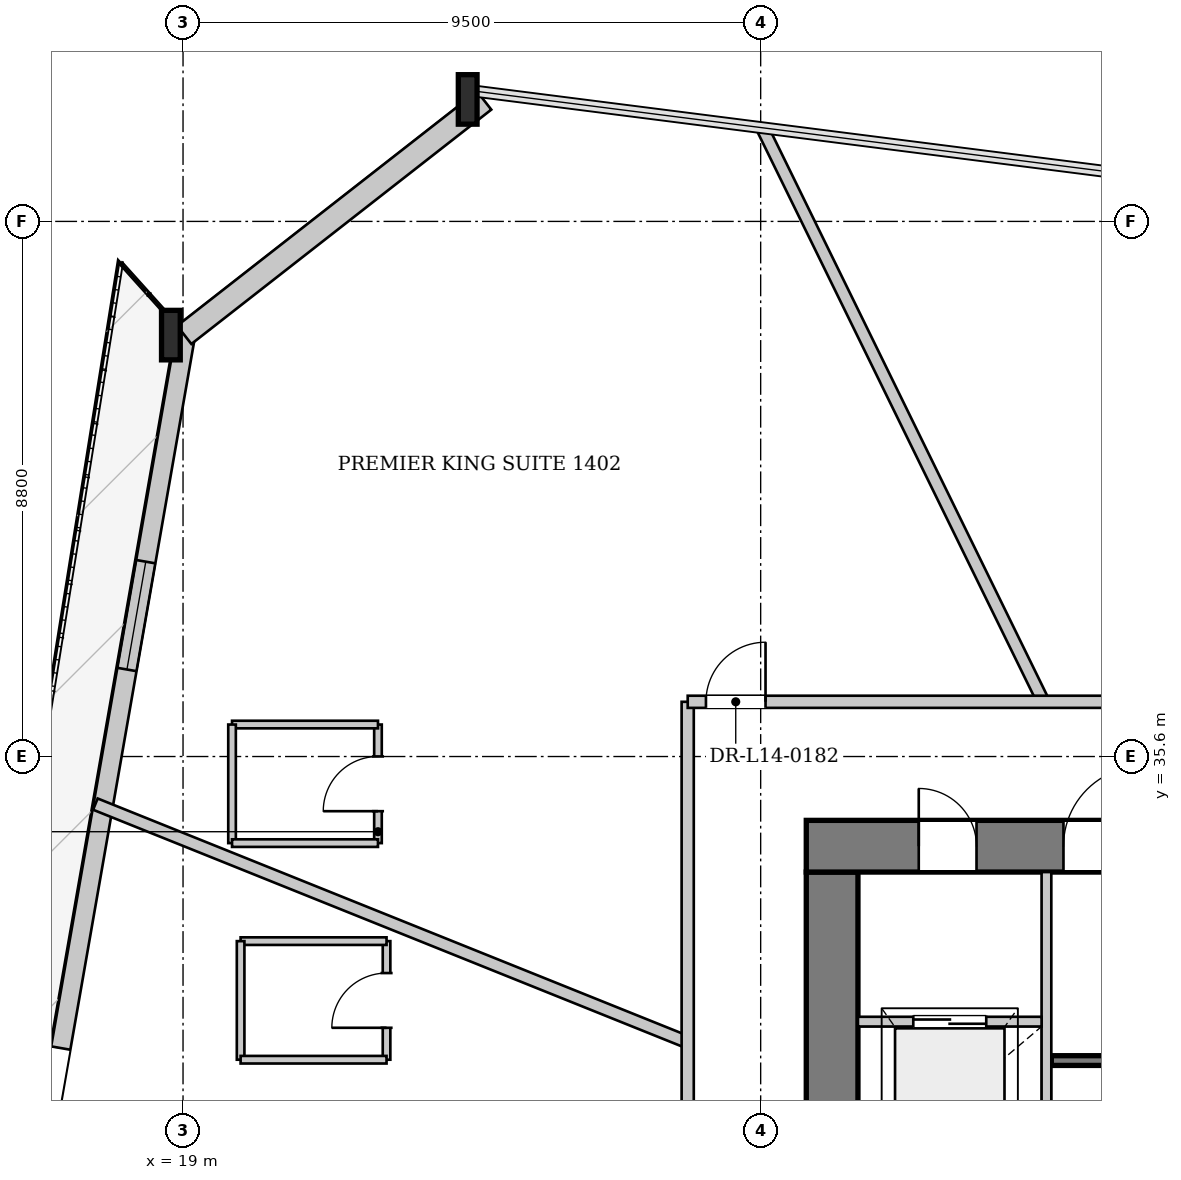
"""IFC4 building model, lengths in metres.
Left out: names, types, materials, properties, quantities, classifications, styles, units other than length and angle.
Written with IfcOpenShell. Run it as: python <this file> out.ifc"""

import sys

from ifc_helpers import new_model, si_unit, direction, frame, frame_2d, origin, origin_2d, place, context, subcontext, project, spatial, rectangle, i_section, extrude, source, transform, mapped, element, fill, save


model = new_model("IFC4")
c1 = context("Model", 3, precision=1e-05, world=origin(), true_north=direction((0.0, 1.0)))
c2 = subcontext(c1, "Body", "Model", "MODEL_VIEW")
j1 = project(units=[si_unit("LENGTHUNIT", "METRE"), si_unit("PLANEANGLEUNIT", "RADIAN")], contexts=[c1])
p1 = place(None, origin())
s1 = spatial("IfcSite", under=j1, at=p1, CompositionType="ELEMENT")
p2 = place(p1, origin())
s2 = spatial("IfcBuilding", under=s1, at=p2, CompositionType="ELEMENT")
p3 = place(p2, frame((0.0, 0.0, 57.7)))
s3 = spatial("IfcBuildingStorey", under=s2, at=p3, CompositionType="ELEMENT", Elevation=57.7)
m1 = source(origin(), c2, "Body", "SweptSolid", [
    extrude(i_section(OverallWidth=0.308, OverallDepth=0.814, WebThickness=0.021, FlangeThickness=0.04, at=origin_2d()), origin(), (0.0, 0.0, 1.0), 3.409),
])
p4 = place(p3, frame((23.836, 46.538, 0.0), z_axis=(-0.090445857066, -0.077269263479, 0.992899293917), x_axis=(0.649551107767, -0.760317932446, 0.0)))
e1 = element("IfcColumn", 1, at=p4, inside=s3, PredefinedType="COLUMN", context=c2, shape_type="MappedRepresentation", body=[
    mapped(m1, transform((0.0, 0.0, 0.0), x_axis=(1.0, 0.0, 0.0), y_axis=(0.0, 1.0, 0.0), z_axis=(0.0, 0.0, 1.0), scale=1.0)),
])
m2 = source(origin(), c2, "Body", "SweptSolid", [
    extrude(i_section(OverallWidth=0.308, OverallDepth=0.814, WebThickness=0.021, FlangeThickness=0.04, at=origin_2d()), origin(), (0.0, 0.0, 1.0), 3.405),
])
p5 = place(p3, frame((18.903, 42.684, 0.0), z_axis=(-0.060441534737, -0.090124566031, 0.994094755784), x_axis=(0.830522417348, -0.556985201133, 0.0)))
e2 = element("IfcColumn", 2, at=p5, inside=s3, PredefinedType="COLUMN", context=c2, shape_type="MappedRepresentation", body=[
    mapped(m2, transform((0.0, 0.0, 0.0), x_axis=(1.0, 0.0, 0.0), y_axis=(0.0, 1.0, 0.0), z_axis=(0.0, 0.0, 1.0), scale=1.0)),
])
p6 = place(p3, frame((15.875, 24.432, 0.0), z_axis=(0.0, 0.0, 1.0), x_axis=(0.172204905353, 0.985061150677, 0.0)))
e3 = element("IfcWall", 3, at=p6, inside=s3, PredefinedType="SOLIDWALL", context=c2, shape_type="SweptSolid", body=[
    extrude(rectangle(XDim=18.5, YDim=0.32, at=frame_2d((9.25, 0.0))), origin(), (0.0, 0.0, 1.0), 2.592),
])
p7 = place(p6, frame((5.37, 0.0, 0.0)))
e4 = element("IfcOpeningElement", 4, at=p7, cuts=e3, PredefinedType="OPENING", context=c2, shape_type="SweptSolid", body=[
    extrude(rectangle(XDim=1.1, YDim=2.3, at=frame_2d((0.55, 1.15))), frame((0.0, 0.17, 0.0), z_axis=(0.0, -1.0, 0.0), x_axis=(1.0, 0.0, 0.0)), (0.0, 0.0, 1.0), 0.34),
])
p8 = place(p6, frame((12.79, 0.0, 0.272)))
e5 = element("IfcOpeningElement", 5, at=p8, cuts=e3, PredefinedType="OPENING", context=c2, shape_type="SweptSolid", body=[
    extrude(rectangle(XDim=1.8, YDim=2.2, at=frame_2d((0.9, 1.1))), frame((0.0, 0.17, 0.0), z_axis=(0.0, -1.0, 0.0), x_axis=(1.0, 0.0, 0.0)), (0.0, 0.0, 1.0), 0.34),
])
p9 = place(p3, frame((19.02, 42.534, 0.0), z_axis=(0.0, 0.0, 1.0), x_axis=(0.787974703517, 0.615707614552, 0.0)))
e6 = element("IfcWall", 6, at=p9, inside=s3, PredefinedType="SOLIDWALL", context=c2, shape_type="SweptSolid", body=[
    extrude(rectangle(XDim=6.26, YDim=0.38, at=frame_2d((3.13, 0.0))), origin(), (0.0, 0.0, 1.0), 2.592),
])
p10 = place(p3, frame((29.675, 19.5, 0.0), z_axis=(0.0, 0.0, 1.0), x_axis=(0.0, 1.0, 0.0)))
e7 = element("IfcWall", 7, at=p10, inside=s3, PredefinedType="SHEAR", context=c2, shape_type="SweptSolid", body=[
    extrude(rectangle(XDim=14.2, YDim=0.85, at=frame_2d((7.1, 0.0))), origin(), (0.0, 0.0, 1.0), 3.3),
])
p11 = place(p10, frame((7.42, 0.0, 0.0)))
e8 = element("IfcOpeningElement", 8, at=p11, cuts=e7, PredefinedType="OPENING", context=c2, shape_type="SweptSolid", body=[
    extrude(rectangle(XDim=1.6, YDim=2.2, at=frame_2d((0.8, 1.1))), frame((0.0, 0.435, 0.0), z_axis=(0.0, -1.0, 0.0), x_axis=(1.0, 0.0, 0.0)), (0.0, 0.0, 1.0), 0.87),
])
p12 = place(p3, frame((29.25, 34.125, 0.0), z_axis=(0.0, 0.0, 1.0), x_axis=(1.0, 0.0, 0.0)))
e9 = element("IfcWall", 9, at=p12, inside=s3, PredefinedType="SHEAR", context=c2, shape_type="SweptSolid", body=[
    extrude(rectangle(XDim=17.5, YDim=0.85, at=frame_2d((8.75, 0.0))), origin(), (0.0, 0.0, 1.0), 3.3),
])
p13 = place(p12, frame((1.85, 0.0, 0.0)))
e10 = element("IfcOpeningElement", 10, at=p13, cuts=e9, PredefinedType="OPENING", context=c2, shape_type="SweptSolid", body=[
    extrude(rectangle(XDim=0.95, YDim=2.1, at=frame_2d((0.475, 1.05))), frame((0.0, 0.435, 0.0), z_axis=(0.0, -1.0, 0.0), x_axis=(1.0, 0.0, 0.0)), (0.0, 0.0, 1.0), 0.87),
])
p14 = place(p12, frame((4.23, 0.0, 0.0)))
e11 = element("IfcOpeningElement", 11, at=p14, cuts=e9, PredefinedType="OPENING", context=c2, shape_type="SweptSolid", body=[
    extrude(rectangle(XDim=1.32, YDim=2.2, at=frame_2d((0.66, 1.1))), frame((0.0, 0.435, 0.0), z_axis=(0.0, -1.0, 0.0), x_axis=(1.0, 0.0, 0.0)), (0.0, 0.0, 1.0), 0.87),
])
p15 = place(p12, frame((15.3, 0.0, 0.0)))
e12 = element("IfcOpeningElement", 12, at=p15, cuts=e9, PredefinedType="OPENING", context=c2, shape_type="SweptSolid", body=[
    extrude(rectangle(XDim=0.95, YDim=2.1, at=frame_2d((0.475, 1.05))), frame((0.0, 0.435, 0.0), z_axis=(0.0, -1.0, 0.0), x_axis=(1.0, 0.0, 0.0)), (0.0, 0.0, 1.0), 0.87),
])
p16 = place(p3, frame((33.28, 30.6, 0.0), z_axis=(0.0, 0.0, 1.0), x_axis=(1.0, 0.0, 0.0)))
e13 = element("IfcWall", 13, at=p16, inside=s3, PredefinedType="PARTITIONING", context=c2, shape_type="SweptSolid", body=[
    extrude(rectangle(XDim=7.3, YDim=0.16, at=frame_2d((3.65, 0.0))), origin(), (0.0, 0.0, 1.0), 3.3),
])
p17 = place(p3, frame((33.2, 28.44, 0.0), z_axis=(0.0, 0.0, 1.0), x_axis=(0.0, 1.0, 0.0)))
e14 = element("IfcWall", 14, at=p17, inside=s3, PredefinedType="PARTITIONING", context=c2, shape_type="SweptSolid", body=[
    extrude(rectangle(XDim=5.26, YDim=0.16, at=frame_2d((2.63, 0.0))), origin(), (0.0, 0.0, 1.0), 3.3),
])
p18 = place(p3, frame((30.1, 31.24, 0.0), z_axis=(0.0, 0.0, 1.0), x_axis=(1.0, 0.0, 0.0)))
e15 = element("IfcWall", 15, at=p18, inside=s3, PredefinedType="PARTITIONING", context=c2, shape_type="SweptSolid", body=[
    extrude(rectangle(XDim=3.02, YDim=0.16, at=frame_2d((1.51, 0.0))), origin(), (0.0, 0.0, 1.0), 3.3),
])
p19 = place(p18, frame((0.91, 0.0, 0.0)))
e16 = element("IfcOpeningElement", 16, at=p19, cuts=e15, PredefinedType="OPENING", context=c2, shape_type="SweptSolid", body=[
    extrude(rectangle(XDim=1.2, YDim=2.2, at=frame_2d((0.6, 1.1))), frame((0.0, 0.09, 0.0), z_axis=(0.0, -1.0, 0.0), x_axis=(1.0, 0.0, 0.0)), (0.0, 0.0, 1.0), 0.18),
])
p20 = place(p3, frame((33.15, 36.5, 0.0), z_axis=(0.0, 0.0, 1.0), x_axis=(-0.439918845191, 0.898037532426, 0.0)))
e17 = element("IfcWall", 17, at=p20, inside=s3, PredefinedType="PARTITIONING", context=c2, shape_type="SweptSolid", body=[
    extrude(rectangle(XDim=10.477, YDim=0.2, at=frame_2d((5.238, 0.0))), origin(), (0.0, 0.0, 1.0), 3.3),
])
p21 = place(p3, frame((27.3, 30.901, 0.0), z_axis=(0.0, 0.0, 1.0), x_axis=(-0.927840286719, 0.372977750463, 0.0)))
e18 = element("IfcWall", 18, at=p21, inside=s3, PredefinedType="PARTITIONING", context=c2, shape_type="SweptSolid", body=[
    extrude(rectangle(XDim=10.499, YDim=0.2, at=frame_2d((5.25, 0.0))), origin(), (0.0, 0.0, 1.0), 3.3),
])
p22 = place(p3, frame((22.206, 34.176, 0.0), z_axis=(0.0, 0.0, 1.0), x_axis=(0.0, 1.0, 0.0)))
e19 = element("IfcWall", 19, at=p22, inside=s3, PredefinedType="PARTITIONING", context=c2, shape_type="SweptSolid", body=[
    extrude(rectangle(XDim=1.95, YDim=0.125, at=frame_2d((0.975, 0.0))), origin(), (0.0, 0.0, 1.0), 2.925),
])
p23 = place(p22, frame((0.525, 0.0, 0.0)))
e20 = element("IfcOpeningElement", 20, at=p23, cuts=e19, PredefinedType="OPENING", context=c2, shape_type="SweptSolid", body=[
    extrude(rectangle(XDim=0.9, YDim=2.1, at=frame_2d((0.45, 1.05))), frame((0.0, 0.073, 0.0), z_axis=(0.0, -1.0, 0.0), x_axis=(1.0, 0.0, 0.0)), (0.0, 0.0, 1.0), 0.145),
])
p24 = place(p3, frame((22.206, 36.126, 0.0), z_axis=(0.0, 0.0, 1.0), x_axis=(-1.0, 0.0, 0.0)))
e21 = element("IfcWall", 21, at=p24, inside=s3, PredefinedType="PARTITIONING", context=c2, shape_type="SweptSolid", body=[
    extrude(rectangle(XDim=2.4, YDim=0.125, at=frame_2d((1.2, 0.0))), origin(), (0.0, 0.0, 1.0), 3.3),
])
p25 = place(p3, frame((19.806, 36.126, 0.0), z_axis=(0.0, 0.0, 1.0), x_axis=(0.0, -1.0, 0.0)))
e22 = element("IfcWall", 22, at=p25, inside=s3, PredefinedType="PARTITIONING", context=c2, shape_type="SweptSolid", body=[
    extrude(rectangle(XDim=1.95, YDim=0.125, at=frame_2d((0.975, 0.0))), origin(), (0.0, 0.0, 1.0), 3.3),
])
p26 = place(p3, frame((19.806, 34.176, 0.0), z_axis=(0.0, 0.0, 1.0), x_axis=(1.0, 0.0, 0.0)))
e23 = element("IfcWall", 23, at=p26, inside=s3, PredefinedType="PARTITIONING", context=c2, shape_type="SweptSolid", body=[
    extrude(rectangle(XDim=2.4, YDim=0.125, at=frame_2d((1.2, 0.0))), origin(), (0.0, 0.0, 1.0), 3.3),
])
p27 = place(p3, frame((22.347, 30.614, 0.0), z_axis=(0.0, 0.0, 1.0), x_axis=(0.0, 1.0, 0.0)))
e24 = element("IfcWall", 24, at=p27, inside=s3, PredefinedType="PARTITIONING", context=c2, shape_type="SweptSolid", body=[
    extrude(rectangle(XDim=1.95, YDim=0.125, at=frame_2d((0.975, 0.0))), origin(), (0.0, 0.0, 1.0), 2.925),
])
p28 = place(p27, frame((0.525, 0.0, 0.0)))
e25 = element("IfcOpeningElement", 25, at=p28, cuts=e24, PredefinedType="OPENING", context=c2, shape_type="SweptSolid", body=[
    extrude(rectangle(XDim=0.9, YDim=2.1, at=frame_2d((0.45, 1.05))), frame((0.0, 0.073, 0.0), z_axis=(0.0, -1.0, 0.0), x_axis=(1.0, 0.0, 0.0)), (0.0, 0.0, 1.0), 0.145),
])
p29 = place(p3, frame((22.347, 32.564, 0.0), z_axis=(0.0, 0.0, 1.0), x_axis=(-1.0, 0.0, 0.0)))
e26 = element("IfcWall", 26, at=p29, inside=s3, PredefinedType="PARTITIONING", context=c2, shape_type="SweptSolid", body=[
    extrude(rectangle(XDim=2.4, YDim=0.125, at=frame_2d((1.2, 0.0))), origin(), (0.0, 0.0, 1.0), 3.3),
])
p30 = place(p3, frame((19.947, 32.564, 0.0), z_axis=(0.0, 0.0, 1.0), x_axis=(0.0, -1.0, 0.0)))
e27 = element("IfcWall", 27, at=p30, inside=s3, PredefinedType="PARTITIONING", context=c2, shape_type="SweptSolid", body=[
    extrude(rectangle(XDim=1.95, YDim=0.125, at=frame_2d((0.975, 0.0))), origin(), (0.0, 0.0, 1.0), 3.3),
])
p31 = place(p3, frame((19.947, 30.614, 0.0), z_axis=(0.0, 0.0, 1.0), x_axis=(1.0, 0.0, 0.0)))
e28 = element("IfcWall", 28, at=p31, inside=s3, PredefinedType="PARTITIONING", context=c2, shape_type="SweptSolid", body=[
    extrude(rectangle(XDim=2.4, YDim=0.125, at=frame_2d((1.2, 0.0))), origin(), (0.0, 0.0, 1.0), 3.3),
])
p32 = place(p3, frame((27.3, 16.7, 0.0), z_axis=(0.0, 0.0, 1.0), x_axis=(0.0, 1.0, 0.0)))
e29 = element("IfcWall", 29, at=p32, inside=s3, PredefinedType="PARTITIONING", context=c2, shape_type="SweptSolid", body=[
    extrude(rectangle(XDim=19.8, YDim=0.2, at=frame_2d((9.9, 0.0))), origin(), (0.0, 0.0, 1.0), 3.3),
])
p33 = place(p32, frame((10.32, 0.0, 0.0)))
e30 = element("IfcOpeningElement", 30, at=p33, cuts=e29, PredefinedType="OPENING", context=c2, shape_type="SweptSolid", body=[
    extrude(rectangle(XDim=0.98, YDim=2.15, at=frame_2d((0.49, 1.075))), frame((0.0, 0.11, 0.0), z_axis=(0.0, -1.0, 0.0), x_axis=(1.0, 0.0, 0.0)), (0.0, 0.0, 1.0), 0.22),
])
p34 = place(p3, frame((27.3, 36.5, 0.0), z_axis=(0.0, 0.0, 1.0), x_axis=(1.0, 0.0, 0.0)))
e31 = element("IfcWall", 31, at=p34, inside=s3, PredefinedType="PARTITIONING", context=c2, shape_type="SweptSolid", body=[
    extrude(rectangle(XDim=21.4, YDim=0.2, at=frame_2d((10.7, 0.0))), origin(), (0.0, 0.0, 1.0), 3.3),
])
p35 = place(p34, frame((20.12, 0.0, 0.0)))
e32 = element("IfcOpeningElement", 32, at=p35, cuts=e31, PredefinedType="OPENING", context=c2, shape_type="SweptSolid", body=[
    extrude(rectangle(XDim=0.98, YDim=2.15, at=frame_2d((0.49, 1.075))), frame((0.0, 0.11, 0.0), z_axis=(0.0, -1.0, 0.0), x_axis=(1.0, 0.0, 0.0)), (0.0, 0.0, 1.0), 0.22),
])
p36 = place(p34, frame((0.3, 0.0, 0.0)))
e33 = element("IfcOpeningElement", 33, at=p36, cuts=e31, PredefinedType="OPENING", context=c2, shape_type="SweptSolid", body=[
    extrude(rectangle(XDim=0.98, YDim=2.15, at=frame_2d((0.49, 1.075))), frame((0.0, 0.11, 0.0), z_axis=(0.0, -1.0, 0.0), x_axis=(1.0, 0.0, 0.0)), (0.0, 0.0, 1.0), 0.22),
])
m3 = source(origin(), c2, "Body", "SweptSolid", [
    extrude(rectangle(XDim=1.1, YDim=2.3, at=frame_2d((0.55, 1.15))), frame((0.0, 0.025, 0.0), z_axis=(0.0, -1.0, 0.0), x_axis=(1.0, 0.0, 0.0)), (0.0, 0.0, 1.0), 0.05),
])
p37 = place(p7, origin())
e34 = element("IfcDoor", 34, at=p37, inside=s3, OperationType="SINGLE_SWING_LEFT", PredefinedType="DOOR", context=c2, shape_type="MappedRepresentation", body=[
    mapped(m3, transform((0.0, 0.0, 0.0), x_axis=(1.0, 0.0, 0.0), y_axis=(0.0, 1.0, 0.0), z_axis=(0.0, 0.0, 1.0), scale=1.0)),
])
fill(e4, e34)
m4 = source(origin(), c2, "Body", "SweptSolid", [
    extrude(rectangle(XDim=1.8, YDim=2.2, at=frame_2d((0.9, 1.1))), frame((0.0, 0.03, 0.0), z_axis=(0.0, -1.0, 0.0), x_axis=(1.0, 0.0, 0.0)), (0.0, 0.0, 1.0), 0.06),
])
p38 = place(p8, origin())
e35 = element("IfcWindow", 35, at=p38, inside=s3, PartitioningType="SINGLE_PANEL", PredefinedType="WINDOW", context=c2, shape_type="MappedRepresentation", body=[
    mapped(m4, transform((0.0, 0.0, 0.0), x_axis=(1.0, 0.0, 0.0), y_axis=(0.0, 1.0, 0.0), z_axis=(0.0, 0.0, 1.0), scale=1.0)),
])
fill(e5, e35)
m5 = source(origin(), c2, "Body", "SweptSolid", [
    extrude(rectangle(XDim=0.95, YDim=2.1, at=frame_2d((0.475, 1.05))), frame((0.0, 0.025, 0.0), z_axis=(0.0, -1.0, 0.0), x_axis=(1.0, 0.0, 0.0)), (0.0, 0.0, 1.0), 0.05),
])
p39 = place(p13, origin())
e36 = element("IfcDoor", 36, at=p39, inside=s3, OperationType="SINGLE_SWING_LEFT", PredefinedType="DOOR", context=c2, shape_type="MappedRepresentation", body=[
    mapped(m5, transform((0.0, 0.0, 0.0), x_axis=(1.0, 0.0, 0.0), y_axis=(0.0, 1.0, 0.0), z_axis=(0.0, 0.0, 1.0), scale=1.0)),
])
fill(e10, e36)
m6 = source(origin(), c2, "Body", "SweptSolid", [
    extrude(rectangle(XDim=1.32, YDim=2.2, at=frame_2d((0.66, 1.1))), frame((0.0, 0.025, 0.0), z_axis=(0.0, -1.0, 0.0), x_axis=(1.0, 0.0, 0.0)), (0.0, 0.0, 1.0), 0.05),
])
p40 = place(p14, origin())
e37 = element("IfcDoor", 37, at=p40, inside=s3, OperationType="SINGLE_SWING_RIGHT", PredefinedType="DOOR", context=c2, shape_type="MappedRepresentation", body=[
    mapped(m6, transform((0.0, 0.0, 0.0), x_axis=(1.0, 0.0, 0.0), y_axis=(0.0, 1.0, 0.0), z_axis=(0.0, 0.0, 1.0), scale=1.0)),
])
fill(e11, e37)
m7 = source(origin(), c2, "Body", "SweptSolid", [
    extrude(rectangle(XDim=1.2, YDim=2.2, at=frame_2d((0.6, 1.1))), frame((0.0, 0.025, 0.0), z_axis=(0.0, -1.0, 0.0), x_axis=(1.0, 0.0, 0.0)), (0.0, 0.0, 1.0), 0.05),
])
p41 = place(p19, origin())
e38 = element("IfcDoor", 38, at=p41, inside=s3, OperationType="DOUBLE_DOOR_SLIDING", PredefinedType="DOOR", context=c2, shape_type="MappedRepresentation", body=[
    mapped(m7, transform((0.0, 0.0, 0.0), x_axis=(1.0, 0.0, 0.0), y_axis=(0.0, 1.0, 0.0), z_axis=(0.0, 0.0, 1.0), scale=1.0)),
])
fill(e16, e38)
m8 = source(origin(), c2, "Body", "SweptSolid", [
    extrude(rectangle(XDim=0.9, YDim=2.1, at=frame_2d((0.45, 1.05))), frame((0.0, 0.025, 0.0), z_axis=(0.0, -1.0, 0.0), x_axis=(1.0, 0.0, 0.0)), (0.0, 0.0, 1.0), 0.05),
])
p42 = place(p23, origin())
e39 = element("IfcDoor", 39, at=p42, inside=s3, OperationType="SINGLE_SWING_LEFT", PredefinedType="DOOR", context=c2, shape_type="MappedRepresentation", body=[
    mapped(m8, transform((0.0, 0.0, 0.0), x_axis=(1.0, 0.0, 0.0), y_axis=(0.0, 1.0, 0.0), z_axis=(0.0, 0.0, 1.0), scale=1.0)),
])
fill(e20, e39)
p43 = place(p28, origin())
e40 = element("IfcDoor", 40, at=p43, inside=s3, OperationType="SINGLE_SWING_LEFT", PredefinedType="DOOR", context=c2, shape_type="MappedRepresentation", body=[
    mapped(m8, transform((0.0, 0.0, 0.0), x_axis=(1.0, 0.0, 0.0), y_axis=(0.0, 1.0, 0.0), z_axis=(0.0, 0.0, 1.0), scale=1.0)),
])
fill(e25, e40)
m9 = source(origin(), c2, "Body", "SweptSolid", [
    extrude(rectangle(XDim=0.98, YDim=2.15, at=frame_2d((0.49, 1.075))), frame((0.0, 0.025, 0.0), z_axis=(0.0, -1.0, 0.0), x_axis=(1.0, 0.0, 0.0)), (0.0, 0.0, 1.0), 0.05),
])
p44 = place(p36, origin())
e41 = element("IfcDoor", 41, at=p44, inside=s3, OperationType="SINGLE_SWING_RIGHT", PredefinedType="DOOR", context=c2, shape_type="MappedRepresentation", body=[
    mapped(m9, transform((0.0, 0.0, 0.0), x_axis=(1.0, 0.0, 0.0), y_axis=(0.0, 1.0, 0.0), z_axis=(0.0, 0.0, 1.0), scale=1.0)),
])
fill(e33, e41)
save(model, sys.argv[1])
